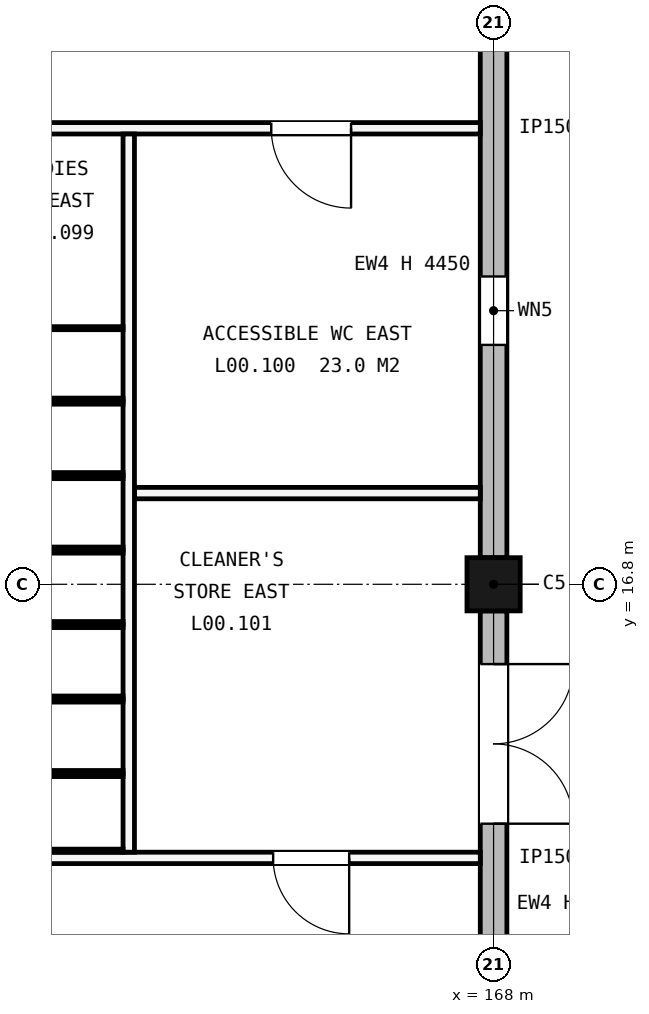
"""IFC4 building model, lengths in metres.
Left out: names, types, materials, properties, quantities, classifications, styles, units other than length and angle.
Written with IfcOpenShell. Run it as: python <this file> out.ifc"""

import sys

from ifc_helpers import new_model, si_unit, direction, frame, frame_2d, origin, origin_2d, place, context, subcontext, project, spatial, rectangle, extrude, element, fill, save


model = new_model("IFC4")
c1 = context("Model", 3, precision=1e-05, world=origin(), true_north=direction((0.0, 1.0)))
c2 = subcontext(c1, "Body", "Model", "MODEL_VIEW")
j1 = project(units=[si_unit("LENGTHUNIT", "METRE"), si_unit("PLANEANGLEUNIT", "RADIAN")], contexts=[c1])
p1 = place(None, origin())
s1 = spatial("IfcSite", under=j1, at=p1, CompositionType="ELEMENT")
p2 = place(p1, origin())
s2 = spatial("IfcBuilding", under=s1, at=p2, CompositionType="ELEMENT")
p3 = place(p2, origin())
s3 = spatial("IfcBuildingStorey", under=s2, at=p3, CompositionType="ELEMENT", Elevation=0.0)
p4 = place(p3, frame((168.0, 16.8, -0.3), z_axis=(0.0, 0.0, 1.0), x_axis=(1.0, 0.0, 0.0)))
e1 = element("IfcColumn", 1, at=p4, inside=s3, PredefinedType="COLUMN", context=c2, shape_type="SweptSolid", body=[
    extrude(rectangle(XDim=0.7, YDim=0.7, at=origin_2d()), origin(), (0.0, 0.0, 1.0), 5.4),
])
p5 = place(p3, frame((168.0, 8.75, 0.0), z_axis=(0.0, 0.0, 1.0), x_axis=(0.0, 1.0, 0.0)))
e2 = element("IfcWall", 2, at=p5, inside=s3, PredefinedType="STANDARD", context=c2, shape_type="SweptSolid", body=[
    extrude(rectangle(XDim=7.7, YDim=0.35, at=frame_2d((3.85, 0.0))), origin(), (0.0, 0.0, 1.0), 4.45),
])
p6 = place(p5, frame((2.8, 0.0, 0.0), z_axis=(0.0, 0.0, 1.0), x_axis=(-1.0, 0.0, 0.0)))
e3 = element("IfcOpeningElement", 3, at=p6, cuts=e2, PredefinedType="OPENING", context=c2, shape_type="SweptSolid", body=[
    extrude(rectangle(XDim=2.1, YDim=2.2, at=frame_2d((1.05, 1.1))), frame((0.0, 0.185, 0.0), z_axis=(0.0, -1.0, 0.0), x_axis=(1.0, 0.0, 0.0)), (0.0, 0.0, 1.0), 0.37),
])
p7 = place(p5, frame((7.0, 0.0, 0.0), z_axis=(0.0, 0.0, 1.0), x_axis=(-1.0, 0.0, 0.0)))
e4 = element("IfcOpeningElement", 4, at=p7, cuts=e2, PredefinedType="OPENING", context=c2, shape_type="SweptSolid", body=[
    extrude(rectangle(XDim=2.1, YDim=2.2, at=frame_2d((1.05, 1.1))), frame((0.0, 0.185, 0.0), z_axis=(0.0, -1.0, 0.0), x_axis=(1.0, 0.0, 0.0)), (0.0, 0.0, 1.0), 0.37),
])
p8 = place(p3, frame((168.0, 17.15, 0.0), z_axis=(0.0, 0.0, 1.0), x_axis=(0.0, 1.0, 0.0)))
e5 = element("IfcWall", 5, at=p8, inside=s3, PredefinedType="STANDARD", context=c2, shape_type="SweptSolid", body=[
    extrude(rectangle(XDim=7.7, YDim=0.35, at=frame_2d((3.85, 0.0))), origin(), (0.0, 0.0, 1.0), 4.45),
])
p9 = place(p8, frame((2.8, 0.0, 2.1)))
e6 = element("IfcOpeningElement", 6, at=p9, cuts=e5, PredefinedType="OPENING", context=c2, shape_type="SweptSolid", body=[
    extrude(rectangle(XDim=0.9, YDim=0.6, at=frame_2d((0.45, 0.3))), frame((0.0, 0.185, 0.0), z_axis=(0.0, -1.0, 0.0), x_axis=(1.0, 0.0, 0.0)), (0.0, 0.0, 1.0), 0.37),
])
p10 = place(p3, frame((151.275, 13.2, 0.0), z_axis=(0.0, 0.0, 1.0), x_axis=(1.0, 0.0, 0.0)))
e7 = element("IfcWall", 7, at=p10, inside=s3, PredefinedType="PARTITIONING", context=c2, shape_type="SweptSolid", body=[
    extrude(rectangle(XDim=16.55, YDim=0.15, at=frame_2d((8.275, 0.0))), origin(), (0.0, 0.0, 1.0), 5.1),
])
p11 = place(p10, frame((13.825, 0.0, 0.0)))
e8 = element("IfcOpeningElement", 8, at=p11, cuts=e7, PredefinedType="OPENING", context=c2, shape_type="SweptSolid", body=[
    extrude(rectangle(XDim=1.0, YDim=2.1, at=frame_2d((0.5, 1.05))), frame((0.0, 0.085, 0.0), z_axis=(0.0, -1.0, 0.0), x_axis=(1.0, 0.0, 0.0)), (0.0, 0.0, 1.0), 0.17),
])
p12 = place(p3, frame((163.275, 18.0, 0.0), z_axis=(0.0, 0.0, 1.0), x_axis=(1.0, 0.0, 0.0)))
e9 = element("IfcWall", 9, at=p12, inside=s3, PredefinedType="PARTITIONING", context=c2, shape_type="SweptSolid", body=[
    extrude(rectangle(XDim=4.55, YDim=0.15, at=frame_2d((2.275, 0.0))), origin(), (0.0, 0.0, 1.0), 5.1),
])
p13 = place(p3, frame((151.275, 22.8, 0.0), z_axis=(0.0, 0.0, 1.0), x_axis=(1.0, 0.0, 0.0)))
e10 = element("IfcWall", 10, at=p13, inside=s3, PredefinedType="PARTITIONING", context=c2, shape_type="SweptSolid", body=[
    extrude(rectangle(XDim=16.55, YDim=0.15, at=frame_2d((8.275, 0.0))), origin(), (0.0, 0.0, 1.0), 5.1),
])
p14 = place(p13, frame((2.475, 0.0, 0.0)))
e11 = element("IfcOpeningElement", 11, at=p14, cuts=e10, PredefinedType="OPENING", context=c2, shape_type="SweptSolid", body=[
    extrude(rectangle(XDim=0.9, YDim=2.1, at=frame_2d((0.45, 1.05))), frame((0.0, 0.085, 0.0), z_axis=(0.0, -1.0, 0.0), x_axis=(1.0, 0.0, 0.0)), (0.0, 0.0, 1.0), 0.17),
])
p15 = place(p13, frame((8.475, 0.0, 0.0)))
e12 = element("IfcOpeningElement", 12, at=p15, cuts=e10, PredefinedType="OPENING", context=c2, shape_type="SweptSolid", body=[
    extrude(rectangle(XDim=0.9, YDim=2.1, at=frame_2d((0.45, 1.05))), frame((0.0, 0.085, 0.0), z_axis=(0.0, -1.0, 0.0), x_axis=(1.0, 0.0, 0.0)), (0.0, 0.0, 1.0), 0.17),
])
p16 = place(p13, frame((13.8, 0.0, 0.0)))
e13 = element("IfcOpeningElement", 13, at=p16, cuts=e10, PredefinedType="OPENING", context=c2, shape_type="SweptSolid", body=[
    extrude(rectangle(XDim=1.05, YDim=2.25, at=frame_2d((0.525, 1.125))), frame((0.0, 0.085, 0.0), z_axis=(0.0, -1.0, 0.0), x_axis=(1.0, 0.0, 0.0)), (0.0, 0.0, 1.0), 0.17),
])
p17 = place(p3, frame((163.2, 13.275, 0.0), z_axis=(0.0, 0.0, 1.0), x_axis=(0.0, 1.0, 0.0)))
e14 = element("IfcWall", 14, at=p17, inside=s3, PredefinedType="PARTITIONING", context=c2, shape_type="SweptSolid", body=[
    extrude(rectangle(XDim=9.45, YDim=0.15, at=frame_2d((4.725, 0.0))), origin(), (0.0, 0.0, 1.0), 5.1),
])
for number, where, z_axis, x_axis in (
    (15, (163.125, 13.295, 0.0), (0.0, 0.0, 1.0), (-1.0, 0.0, 0.0)),
    (16, (163.125, 14.29, 0.0), (0.0, 0.0, 1.0), (-1.0, 0.0, 0.0)),
    (17, (163.125, 14.33, 0.0), (0.0, 0.0, 1.0), (-1.0, 0.0, 0.0)),
    (18, (163.125, 15.27, 0.0), (0.0, 0.0, 1.0), (-1.0, 0.0, 0.0)),
    (19, (163.125, 15.31, 0.0), (0.0, 0.0, 1.0), (-1.0, 0.0, 0.0)),
    (20, (163.125, 16.25, 0.0), (0.0, 0.0, 1.0), (-1.0, 0.0, 0.0)),
    (21, (163.125, 16.29, 0.0), (0.0, 0.0, 1.0), (-1.0, 0.0, 0.0)),
    (22, (163.125, 17.23, 0.0), (0.0, 0.0, 1.0), (-1.0, 0.0, 0.0)),
    (23, (163.125, 17.27, 0.0), (0.0, 0.0, 1.0), (-1.0, 0.0, 0.0)),
    (24, (163.125, 18.21, 0.0), (0.0, 0.0, 1.0), (-1.0, 0.0, 0.0)),
    (25, (163.125, 18.25, 0.0), (0.0, 0.0, 1.0), (-1.0, 0.0, 0.0)),
    (26, (163.125, 19.19, 0.0), (0.0, 0.0, 1.0), (-1.0, 0.0, 0.0)),
    (27, (163.125, 19.23, 0.0), (0.0, 0.0, 1.0), (-1.0, 0.0, 0.0)),
    (28, (163.125, 20.17, 0.0), (0.0, 0.0, 1.0), (-1.0, 0.0, 0.0)),
):
    element("IfcWall", number, at=place(p3, frame(where, z_axis=z_axis, x_axis=x_axis)), inside=s3, PredefinedType="PARTITIONING", context=c2, shape_type="SweptSolid", body=[
        extrude(rectangle(XDim=1.595, YDim=0.04, at=frame_2d((0.797, 0.0))), origin(), (0.0, 0.0, 1.0), 2.0),
    ])
p18 = place(p7, origin())
e29 = element("IfcDoor", 29, at=p18, inside=s3, OperationType="SINGLE_SWING_LEFT", PredefinedType="DOOR", context=c2, shape_type="SweptSolid", body=[
    extrude(rectangle(XDim=2.1, YDim=0.013, at=frame_2d((1.05, 0.007))), frame((0.0, 0.115, 0.0), z_axis=(0.0, -1.0, 0.0), x_axis=(1.0, 0.0, 0.0)), (0.0, 0.0, 1.0), 0.23),
    extrude(rectangle(XDim=0.075, YDim=2.112, at=frame_2d((0.038, 1.069))), frame((0.0, 0.125, 0.0), z_axis=(0.0, -1.0, 0.0), x_axis=(1.0, 0.0, 0.0)), (0.0, 0.0, 1.0), 0.25),
    extrude(rectangle(XDim=0.075, YDim=2.112, at=frame_2d((2.062, 1.069))), frame((0.0, 0.125, 0.0), z_axis=(0.0, -1.0, 0.0), x_axis=(1.0, 0.0, 0.0)), (0.0, 0.0, 1.0), 0.25),
    extrude(rectangle(XDim=2.1, YDim=0.075, at=frame_2d((1.05, 2.163))), frame((0.0, 0.115, 0.0), z_axis=(0.0, -1.0, 0.0), x_axis=(1.0, 0.0, 0.0)), (0.0, 0.0, 1.0), 0.23),
    extrude(rectangle(XDim=1.95, YDim=0.3, at=frame_2d((1.05, 0.163))), frame((0.0, 0.02, 0.0), z_axis=(0.0, -1.0, 0.0), x_axis=(1.0, 0.0, 0.0)), (0.0, 0.0, 1.0), 0.04),
    extrude(rectangle(XDim=1.95, YDim=0.12, at=frame_2d((1.05, 2.065))), frame((0.0, 0.02, 0.0), z_axis=(0.0, -1.0, 0.0), x_axis=(1.0, 0.0, 0.0)), (0.0, 0.0, 1.0), 0.04),
    extrude(rectangle(XDim=0.09, YDim=1.692, at=frame_2d((0.12, 1.159))), frame((0.0, 0.025, 0.0), z_axis=(0.0, -1.0, 0.0), x_axis=(1.0, 0.0, 0.0)), (0.0, 0.0, 1.0), 0.05),
    extrude(rectangle(XDim=0.18, YDim=1.692, at=frame_2d((1.05, 1.159))), frame((0.0, 0.025, 0.0), z_axis=(0.0, -1.0, 0.0), x_axis=(1.0, 0.0, 0.0)), (0.0, 0.0, 1.0), 0.05),
    extrude(rectangle(XDim=0.09, YDim=1.692, at=frame_2d((1.98, 1.159))), frame((0.0, 0.025, 0.0), z_axis=(0.0, -1.0, 0.0), x_axis=(1.0, 0.0, 0.0)), (0.0, 0.0, 1.0), 0.05),
    extrude(rectangle(XDim=0.795, YDim=1.692, at=frame_2d((0.562, 1.159))), frame((0.0, 0.012, 0.0), z_axis=(0.0, -1.0, 0.0), x_axis=(1.0, 0.0, 0.0)), (0.0, 0.0, 1.0), 0.024),
    extrude(rectangle(XDim=0.795, YDim=1.692, at=frame_2d((1.538, 1.159))), frame((0.0, 0.012, 0.0), z_axis=(0.0, -1.0, 0.0), x_axis=(1.0, 0.0, 0.0)), (0.0, 0.0, 1.0), 0.024),
])
fill(e4, e29)
p19 = place(p9, origin())
e30 = element("IfcWindow", 30, at=p19, inside=s3, PartitioningType="SINGLE_PANEL", PredefinedType="WINDOW", context=c2, shape_type="SweptSolid", body=[
    extrude(rectangle(XDim=0.9, YDim=0.6, at=frame_2d((0.45, 0.3))), frame((0.0, 0.03, 0.0), z_axis=(0.0, -1.0, 0.0), x_axis=(1.0, 0.0, 0.0)), (0.0, 0.0, 1.0), 0.06),
])
fill(e6, e30)
p20 = place(p16, origin())
e31 = element("IfcDoor", 31, at=p20, inside=s3, OperationType="SINGLE_SWING_RIGHT", PredefinedType="DOOR", context=c2, shape_type="SweptSolid", body=[
    extrude(rectangle(XDim=1.05, YDim=2.25, at=frame_2d((0.525, 1.125))), frame((0.0, 0.025, 0.0), z_axis=(0.0, -1.0, 0.0), x_axis=(1.0, 0.0, 0.0)), (0.0, 0.0, 1.0), 0.05),
])
fill(e13, e31)
p21 = place(p11, origin())
e32 = element("IfcDoor", 32, at=p21, inside=s3, OperationType="SINGLE_SWING_RIGHT", PredefinedType="DOOR", context=c2, shape_type="SweptSolid", body=[
    extrude(rectangle(XDim=1.0, YDim=2.1, at=frame_2d((0.5, 1.05))), frame((0.0, 0.025, 0.0), z_axis=(0.0, -1.0, 0.0), x_axis=(1.0, 0.0, 0.0)), (0.0, 0.0, 1.0), 0.05),
])
fill(e8, e32)
save(model, sys.argv[1])
